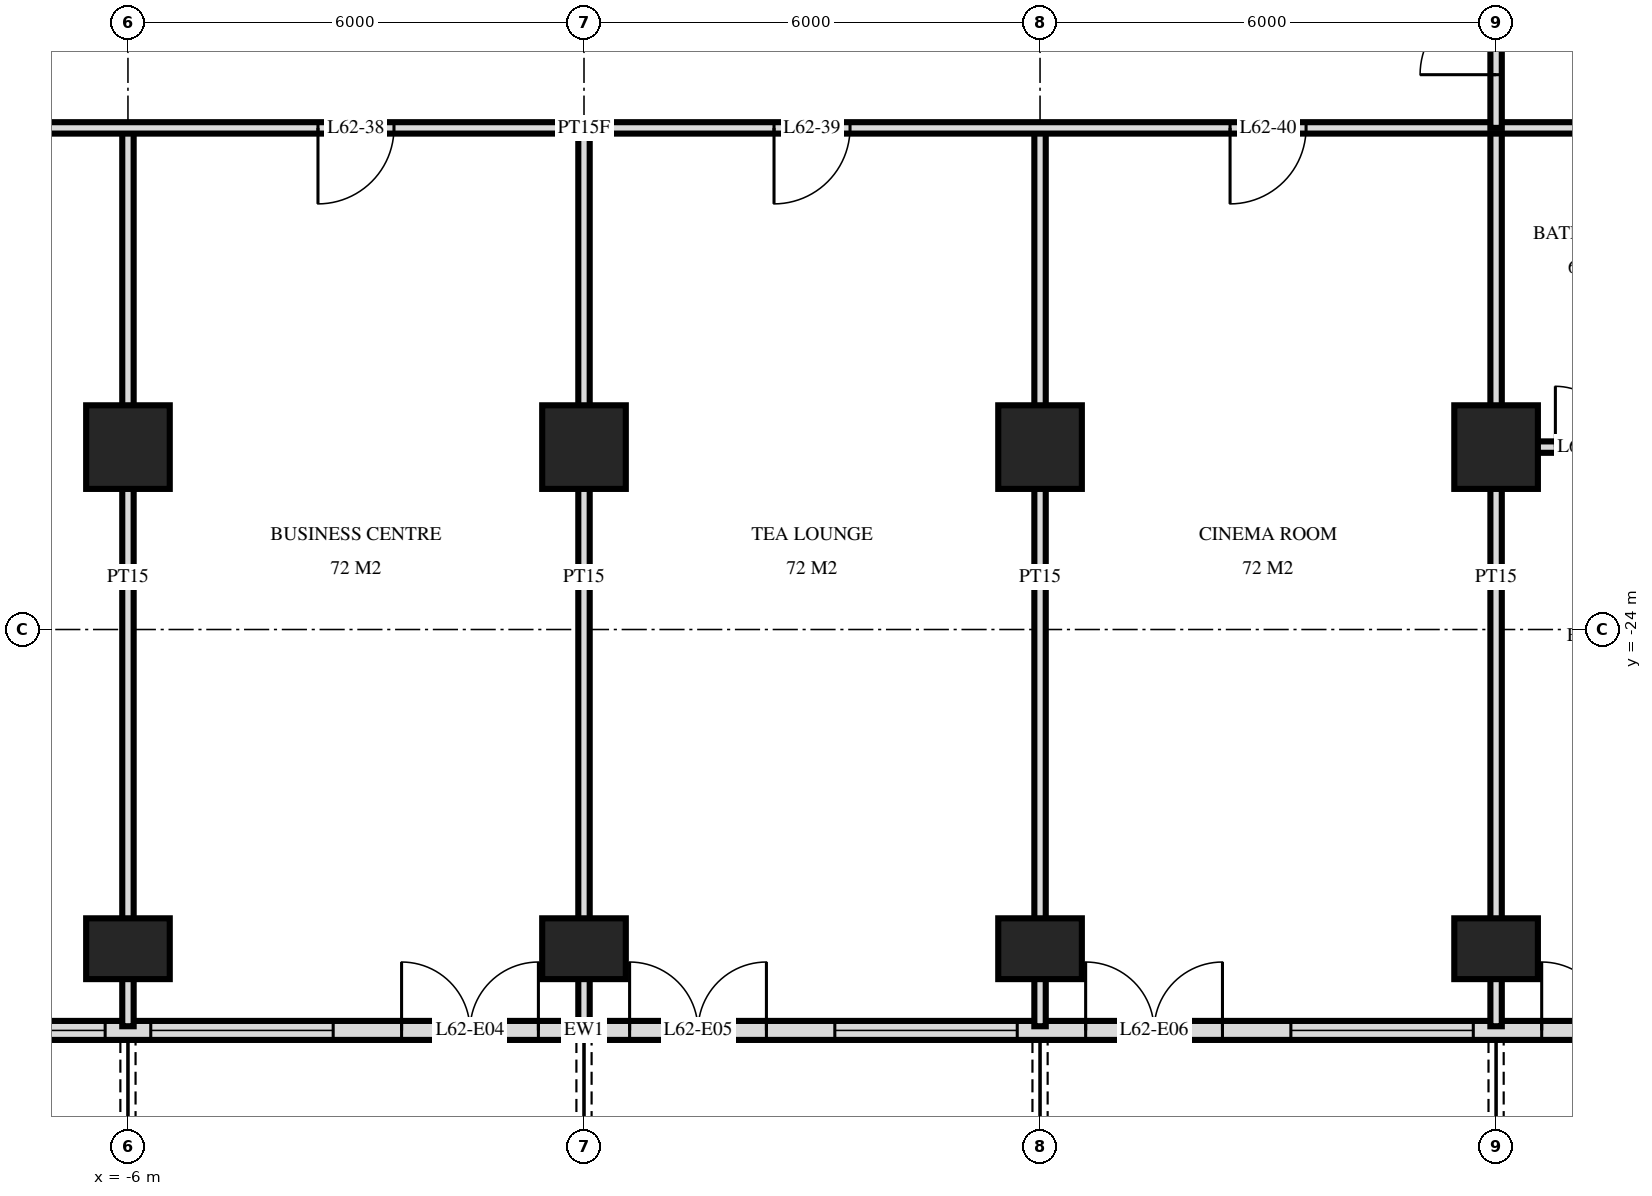
"""IFC4 building model, lengths in metres.
Left out: names, types, materials, properties, quantities, classifications, styles, units other than length and angle.
Written with IfcOpenShell. Run it as: python <this file> out.ifc"""

import sys

from ifc_helpers import new_model, si_unit, direction, frame, frame_2d, origin, origin_2d, place, context, subcontext, project, spatial, rectangle, extrude, element, fill, save


model = new_model("IFC4")
c1 = context("Model", 3, precision=1e-05, world=origin(), true_north=direction((0.0, 1.0)))
c2 = subcontext(c1, "Body", "Model", "MODEL_VIEW")
j1 = project(units=[si_unit("LENGTHUNIT", "METRE"), si_unit("PLANEANGLEUNIT", "RADIAN")], contexts=[c1])
p1 = place(None, origin())
s1 = spatial("IfcSite", under=j1, at=p1, CompositionType="ELEMENT")
p2 = place(p1, origin())
s2 = spatial("IfcBuilding", under=s1, at=p2, CompositionType="ELEMENT")
p3 = place(p2, frame((0.0, 0.0, 236.1)))
s3 = spatial("IfcBuildingStorey", under=s2, at=p3, CompositionType="ELEMENT", Elevation=236.1)
p4 = place(p3, frame((-6.0, -28.2, 0.0), z_axis=(0.0, 0.0, 1.0), x_axis=(1.0, 0.0, 0.0)))
e1 = element("IfcColumn", 1, at=p4, inside=s3, PredefinedType="COLUMN", context=c2, shape_type="SweptSolid", body=[
    extrude(rectangle(XDim=1.1, YDim=0.8, at=origin_2d()), origin(), (0.0, 0.0, 1.0), 3.5),
])
p5 = place(p3, frame((-6.0, -21.6, 0.0), z_axis=(0.0, 0.0, 1.0), x_axis=(1.0, 0.0, 0.0)))
e2 = element("IfcColumn", 2, at=p5, inside=s3, PredefinedType="COLUMN", context=c2, shape_type="SweptSolid", body=[
    extrude(rectangle(XDim=1.1, YDim=1.1, at=origin_2d()), origin(), (0.0, 0.0, 1.0), 3.5),
])
p6 = place(p3, frame((0.0, -28.2, 0.0), z_axis=(0.0, 0.0, 1.0), x_axis=(1.0, 0.0, 0.0)))
e3 = element("IfcColumn", 3, at=p6, inside=s3, PredefinedType="COLUMN", context=c2, shape_type="SweptSolid", body=[
    extrude(rectangle(XDim=1.1, YDim=0.8, at=origin_2d()), origin(), (0.0, 0.0, 1.0), 3.5),
])
p7 = place(p3, frame((0.0, -21.6, 0.0), z_axis=(0.0, 0.0, 1.0), x_axis=(1.0, 0.0, 0.0)))
e4 = element("IfcColumn", 4, at=p7, inside=s3, PredefinedType="COLUMN", context=c2, shape_type="SweptSolid", body=[
    extrude(rectangle(XDim=1.1, YDim=1.1, at=origin_2d()), origin(), (0.0, 0.0, 1.0), 3.5),
])
p8 = place(p3, frame((6.0, -28.2, 0.0), z_axis=(0.0, 0.0, 1.0), x_axis=(1.0, 0.0, 0.0)))
e5 = element("IfcColumn", 5, at=p8, inside=s3, PredefinedType="COLUMN", context=c2, shape_type="SweptSolid", body=[
    extrude(rectangle(XDim=1.1, YDim=0.8, at=origin_2d()), origin(), (0.0, 0.0, 1.0), 3.5),
])
p9 = place(p3, frame((6.0, -21.6, 0.0), z_axis=(0.0, 0.0, 1.0), x_axis=(1.0, 0.0, 0.0)))
e6 = element("IfcColumn", 6, at=p9, inside=s3, PredefinedType="COLUMN", context=c2, shape_type="SweptSolid", body=[
    extrude(rectangle(XDim=1.1, YDim=1.1, at=origin_2d()), origin(), (0.0, 0.0, 1.0), 3.5),
])
p10 = place(p3, frame((12.0, -28.2, 0.0), z_axis=(0.0, 0.0, 1.0), x_axis=(1.0, 0.0, 0.0)))
e7 = element("IfcColumn", 7, at=p10, inside=s3, PredefinedType="COLUMN", context=c2, shape_type="SweptSolid", body=[
    extrude(rectangle(XDim=1.1, YDim=0.8, at=origin_2d()), origin(), (0.0, 0.0, 1.0), 3.5),
])
p11 = place(p3, frame((12.0, -21.6, 0.0), z_axis=(0.0, 0.0, 1.0), x_axis=(1.0, 0.0, 0.0)))
e8 = element("IfcColumn", 8, at=p11, inside=s3, PredefinedType="COLUMN", context=c2, shape_type="SweptSolid", body=[
    extrude(rectangle(XDim=1.1, YDim=1.1, at=origin_2d()), origin(), (0.0, 0.0, 1.0), 3.5),
])
p12 = place(p3, frame((-22.475, -29.275, 0.0), z_axis=(0.0, 0.0, 1.0), x_axis=(1.0, 0.0, 0.0)))
e9 = element("IfcWall", 9, at=p12, inside=s3, PredefinedType="SOLIDWALL", context=c2, shape_type="SweptSolid", body=[
    extrude(rectangle(XDim=44.951, YDim=0.25, at=frame_2d((22.475, 0.0))), origin(), (0.0, 0.0, 1.0), 3.22),
])
p13 = place(p12, frame((0.575, 0.0, 0.0)))
e10 = element("IfcOpeningElement", 10, at=p13, cuts=e9, PredefinedType="OPENING", context=c2, shape_type="SweptSolid", body=[
    extrude(rectangle(XDim=1.8, YDim=2.4, at=frame_2d((0.9, 1.2))), frame((0.0, 0.135, 0.0), z_axis=(0.0, -1.0, 0.0), x_axis=(1.0, 0.0, 0.0)), (0.0, 0.0, 1.0), 0.27),
])
p14 = place(p12, frame((4.775, 0.0, 0.9)))
e11 = element("IfcOpeningElement", 11, at=p14, cuts=e9, PredefinedType="OPENING", context=c2, shape_type="SweptSolid", body=[
    extrude(rectangle(XDim=2.4, YDim=1.5, at=frame_2d((1.2, 0.75))), frame((0.0, 0.135, 0.0), z_axis=(0.0, -1.0, 0.0), x_axis=(1.0, 0.0, 0.0)), (0.0, 0.0, 1.0), 0.27),
])
p15 = place(p12, frame((8.075, 0.0, 0.0)))
e12 = element("IfcOpeningElement", 12, at=p15, cuts=e9, PredefinedType="OPENING", context=c2, shape_type="SweptSolid", body=[
    extrude(rectangle(XDim=1.8, YDim=2.4, at=frame_2d((0.9, 1.2))), frame((0.0, 0.135, 0.0), z_axis=(0.0, -1.0, 0.0), x_axis=(1.0, 0.0, 0.0)), (0.0, 0.0, 1.0), 0.27),
])
p16 = place(p12, frame((11.075, 0.0, 0.0)))
e13 = element("IfcOpeningElement", 13, at=p16, cuts=e9, PredefinedType="OPENING", context=c2, shape_type="SweptSolid", body=[
    extrude(rectangle(XDim=1.8, YDim=2.4, at=frame_2d((0.9, 1.2))), frame((0.0, 0.135, 0.0), z_axis=(0.0, -1.0, 0.0), x_axis=(1.0, 0.0, 0.0)), (0.0, 0.0, 1.0), 0.27),
])
p17 = place(p12, frame((13.775, 0.0, 0.9)))
e14 = element("IfcOpeningElement", 14, at=p17, cuts=e9, PredefinedType="OPENING", context=c2, shape_type="SweptSolid", body=[
    extrude(rectangle(XDim=2.4, YDim=1.5, at=frame_2d((1.2, 0.75))), frame((0.0, 0.135, 0.0), z_axis=(0.0, -1.0, 0.0), x_axis=(1.0, 0.0, 0.0)), (0.0, 0.0, 1.0), 0.27),
])
p18 = place(p12, frame((16.775, 0.0, 0.9)))
e15 = element("IfcOpeningElement", 15, at=p18, cuts=e9, PredefinedType="OPENING", context=c2, shape_type="SweptSolid", body=[
    extrude(rectangle(XDim=2.4, YDim=1.5, at=frame_2d((1.2, 0.75))), frame((0.0, 0.135, 0.0), z_axis=(0.0, -1.0, 0.0), x_axis=(1.0, 0.0, 0.0)), (0.0, 0.0, 1.0), 0.27),
])
p19 = place(p12, frame((20.075, 0.0, 0.0)))
e16 = element("IfcOpeningElement", 16, at=p19, cuts=e9, PredefinedType="OPENING", context=c2, shape_type="SweptSolid", body=[
    extrude(rectangle(XDim=1.8, YDim=2.4, at=frame_2d((0.9, 1.2))), frame((0.0, 0.135, 0.0), z_axis=(0.0, -1.0, 0.0), x_axis=(1.0, 0.0, 0.0)), (0.0, 0.0, 1.0), 0.27),
])
p20 = place(p12, frame((23.075, 0.0, 0.0)))
e17 = element("IfcOpeningElement", 17, at=p20, cuts=e9, PredefinedType="OPENING", context=c2, shape_type="SweptSolid", body=[
    extrude(rectangle(XDim=1.8, YDim=2.4, at=frame_2d((0.9, 1.2))), frame((0.0, 0.135, 0.0), z_axis=(0.0, -1.0, 0.0), x_axis=(1.0, 0.0, 0.0)), (0.0, 0.0, 1.0), 0.27),
])
p21 = place(p12, frame((25.775, 0.0, 0.9)))
e18 = element("IfcOpeningElement", 18, at=p21, cuts=e9, PredefinedType="OPENING", context=c2, shape_type="SweptSolid", body=[
    extrude(rectangle(XDim=2.4, YDim=1.5, at=frame_2d((1.2, 0.75))), frame((0.0, 0.135, 0.0), z_axis=(0.0, -1.0, 0.0), x_axis=(1.0, 0.0, 0.0)), (0.0, 0.0, 1.0), 0.27),
])
p22 = place(p12, frame((29.075, 0.0, 0.0)))
e19 = element("IfcOpeningElement", 19, at=p22, cuts=e9, PredefinedType="OPENING", context=c2, shape_type="SweptSolid", body=[
    extrude(rectangle(XDim=1.8, YDim=2.4, at=frame_2d((0.9, 1.2))), frame((0.0, 0.135, 0.0), z_axis=(0.0, -1.0, 0.0), x_axis=(1.0, 0.0, 0.0)), (0.0, 0.0, 1.0), 0.27),
])
p23 = place(p12, frame((31.775, 0.0, 0.9)))
e20 = element("IfcOpeningElement", 20, at=p23, cuts=e9, PredefinedType="OPENING", context=c2, shape_type="SweptSolid", body=[
    extrude(rectangle(XDim=2.4, YDim=1.5, at=frame_2d((1.2, 0.75))), frame((0.0, 0.135, 0.0), z_axis=(0.0, -1.0, 0.0), x_axis=(1.0, 0.0, 0.0)), (0.0, 0.0, 1.0), 0.27),
])
p24 = place(p12, frame((35.075, 0.0, 0.0)))
e21 = element("IfcOpeningElement", 21, at=p24, cuts=e9, PredefinedType="OPENING", context=c2, shape_type="SweptSolid", body=[
    extrude(rectangle(XDim=1.8, YDim=2.4, at=frame_2d((0.9, 1.2))), frame((0.0, 0.135, 0.0), z_axis=(0.0, -1.0, 0.0), x_axis=(1.0, 0.0, 0.0)), (0.0, 0.0, 1.0), 0.27),
])
p25 = place(p12, frame((41.075, 0.0, 0.0)))
e22 = element("IfcOpeningElement", 22, at=p25, cuts=e9, PredefinedType="OPENING", context=c2, shape_type="SweptSolid", body=[
    extrude(rectangle(XDim=1.8, YDim=2.4, at=frame_2d((0.9, 1.2))), frame((0.0, 0.135, 0.0), z_axis=(0.0, -1.0, 0.0), x_axis=(1.0, 0.0, 0.0)), (0.0, 0.0, 1.0), 0.27),
])
p26 = place(p3, frame((12.0, -17.4, 0.0), z_axis=(0.0, 0.0, 1.0), x_axis=(0.0, 1.0, 0.0)))
e23 = element("IfcWall", 23, at=p26, inside=s3, PredefinedType="PARTITIONING", context=c2, shape_type="SweptSolid", body=[
    extrude(rectangle(XDim=2.35, YDim=0.15, at=frame_2d((1.175, 0.0))), origin(), (0.0, 0.0, 1.0), 3.22),
])
p27 = place(p26, frame((0.7, 0.0, 0.0)))
e24 = element("IfcOpeningElement", 24, at=p27, cuts=e23, PredefinedType="OPENING", context=c2, shape_type="SweptSolid", body=[
    extrude(rectangle(XDim=1.0, YDim=2.1, at=frame_2d((0.5, 1.05))), frame((0.0, 0.085, 0.0), z_axis=(0.0, -1.0, 0.0), x_axis=(1.0, 0.0, 0.0)), (0.0, 0.0, 1.0), 0.17),
])
for number, where, z_axis, x_axis in (
    (25, (12.0, -29.22, 0.0), (0.0, 0.0, 1.0), (0.0, 1.0, 0.0)),
    (26, (6.0, -29.22, 0.0), (0.0, 0.0, 1.0), (0.0, 1.0, 0.0)),
    (27, (0.0, -29.22, 0.0), (0.0, 0.0, 1.0), (0.0, 1.0, 0.0)),
    (28, (-6.0, -29.22, 0.0), (0.0, 0.0, 1.0), (0.0, 1.0, 0.0)),
):
    element("IfcWall", number, at=place(p3, frame(where, z_axis=z_axis, x_axis=x_axis)), inside=s3, PredefinedType="PARTITIONING", context=c2, shape_type="SweptSolid", body=[
        extrude(rectangle(XDim=11.82, YDim=0.15, at=frame_2d((5.91, 0.0))), origin(), (0.0, 0.0, 1.0), 3.22),
    ])
p28 = place(p3, frame((12.0, -21.6, 0.0), z_axis=(0.0, 0.0, 1.0), x_axis=(1.0, 0.0, 0.0)))
e29 = element("IfcWall", 29, at=p28, inside=s3, PredefinedType="PARTITIONING", context=c2, shape_type="SweptSolid", body=[
    extrude(rectangle(XDim=8.4, YDim=0.15, at=frame_2d((4.2, 0.0))), origin(), (0.0, 0.0, 1.0), 3.22),
])
p29 = place(p28, frame((0.78, 0.0, 0.0)))
e30 = element("IfcOpeningElement", 30, at=p29, cuts=e29, PredefinedType="OPENING", context=c2, shape_type="SweptSolid", body=[
    extrude(rectangle(XDim=0.8, YDim=2.1, at=frame_2d((0.4, 1.05))), frame((0.0, 0.085, 0.0), z_axis=(0.0, -1.0, 0.0), x_axis=(1.0, 0.0, 0.0)), (0.0, 0.0, 1.0), 0.17),
])
p30 = place(p28, frame((2.98, 0.0, 0.0)))
e31 = element("IfcOpeningElement", 31, at=p30, cuts=e29, PredefinedType="OPENING", context=c2, shape_type="SweptSolid", body=[
    extrude(rectangle(XDim=0.9, YDim=2.1, at=frame_2d((0.45, 1.05))), frame((0.0, 0.085, 0.0), z_axis=(0.0, -1.0, 0.0), x_axis=(1.0, 0.0, 0.0)), (0.0, 0.0, 1.0), 0.17),
])
p31 = place(p3, frame((-26.82, -17.4, 0.0), z_axis=(0.0, 0.0, 1.0), x_axis=(1.0, 0.0, 0.0)))
e32 = element("IfcWall", 32, at=p31, inside=s3, PredefinedType="PARTITIONING", context=c2, shape_type="SweptSolid", body=[
    extrude(rectangle(XDim=53.64, YDim=0.15, at=frame_2d((26.82, 0.0))), origin(), (0.0, 0.0, 1.0), 3.22),
])
p32 = place(p31, frame((11.97, 0.0, 0.0)))
e33 = element("IfcOpeningElement", 33, at=p32, cuts=e32, PredefinedType="OPENING", context=c2, shape_type="SweptSolid", body=[
    extrude(rectangle(XDim=1.0, YDim=2.1, at=frame_2d((0.5, 1.05))), frame((0.0, 0.085, 0.0), z_axis=(0.0, -1.0, 0.0), x_axis=(1.0, 0.0, 0.0)), (0.0, 0.0, 1.0), 0.17),
])
p33 = place(p31, frame((3.92, 0.0, 0.0)))
e34 = element("IfcOpeningElement", 34, at=p33, cuts=e32, PredefinedType="OPENING", context=c2, shape_type="SweptSolid", body=[
    extrude(rectangle(XDim=1.0, YDim=2.1, at=frame_2d((0.5, 1.05))), frame((0.0, 0.085, 0.0), z_axis=(0.0, -1.0, 0.0), x_axis=(1.0, 0.0, 0.0)), (0.0, 0.0, 1.0), 0.17),
])
p34 = place(p31, frame((5.72, 0.0, 0.0)))
e35 = element("IfcOpeningElement", 35, at=p34, cuts=e32, PredefinedType="OPENING", context=c2, shape_type="SweptSolid", body=[
    extrude(rectangle(XDim=1.0, YDim=2.1, at=frame_2d((0.5, 1.05))), frame((0.0, 0.085, 0.0), z_axis=(0.0, -1.0, 0.0), x_axis=(1.0, 0.0, 0.0)), (0.0, 0.0, 1.0), 0.17),
])
p35 = place(p31, frame((47.72, 0.0, 0.0)))
e36 = element("IfcOpeningElement", 36, at=p35, cuts=e32, PredefinedType="OPENING", context=c2, shape_type="SweptSolid", body=[
    extrude(rectangle(XDim=1.0, YDim=2.1, at=frame_2d((0.5, 1.05))), frame((0.0, 0.085, 0.0), z_axis=(0.0, -1.0, 0.0), x_axis=(1.0, 0.0, 0.0)), (0.0, 0.0, 1.0), 0.17),
])
p36 = place(p31, frame((51.02, 0.0, 0.0)))
e37 = element("IfcOpeningElement", 37, at=p36, cuts=e32, PredefinedType="OPENING", context=c2, shape_type="SweptSolid", body=[
    extrude(rectangle(XDim=1.0, YDim=2.1, at=frame_2d((0.5, 1.05))), frame((0.0, 0.085, 0.0), z_axis=(0.0, -1.0, 0.0), x_axis=(1.0, 0.0, 0.0)), (0.0, 0.0, 1.0), 0.17),
])
p37 = place(p31, frame((17.32, 0.0, 0.0)))
e38 = element("IfcOpeningElement", 38, at=p37, cuts=e32, PredefinedType="OPENING", context=c2, shape_type="SweptSolid", body=[
    extrude(rectangle(XDim=1.0, YDim=2.1, at=frame_2d((0.5, 1.05))), frame((0.0, 0.085, 0.0), z_axis=(0.0, -1.0, 0.0), x_axis=(1.0, 0.0, 0.0)), (0.0, 0.0, 1.0), 0.17),
])
p38 = place(p31, frame((23.32, 0.0, 0.0)))
e39 = element("IfcOpeningElement", 39, at=p38, cuts=e32, PredefinedType="OPENING", context=c2, shape_type="SweptSolid", body=[
    extrude(rectangle(XDim=1.0, YDim=2.1, at=frame_2d((0.5, 1.05))), frame((0.0, 0.085, 0.0), z_axis=(0.0, -1.0, 0.0), x_axis=(1.0, 0.0, 0.0)), (0.0, 0.0, 1.0), 0.17),
])
p39 = place(p31, frame((29.32, 0.0, 0.0)))
e40 = element("IfcOpeningElement", 40, at=p39, cuts=e32, PredefinedType="OPENING", context=c2, shape_type="SweptSolid", body=[
    extrude(rectangle(XDim=1.0, YDim=2.1, at=frame_2d((0.5, 1.05))), frame((0.0, 0.085, 0.0), z_axis=(0.0, -1.0, 0.0), x_axis=(1.0, 0.0, 0.0)), (0.0, 0.0, 1.0), 0.17),
])
p40 = place(p31, frame((35.32, 0.0, 0.0)))
e41 = element("IfcOpeningElement", 41, at=p40, cuts=e32, PredefinedType="OPENING", context=c2, shape_type="SweptSolid", body=[
    extrude(rectangle(XDim=1.0, YDim=2.1, at=frame_2d((0.5, 1.05))), frame((0.0, 0.085, 0.0), z_axis=(0.0, -1.0, 0.0), x_axis=(1.0, 0.0, 0.0)), (0.0, 0.0, 1.0), 0.17),
])
p41 = place(p17, origin())
e42 = element("IfcWindow", 42, at=p41, inside=s3, PartitioningType="SINGLE_PANEL", PredefinedType="WINDOW", context=c2, shape_type="SweptSolid", body=[
    extrude(rectangle(XDim=2.4, YDim=1.5, at=frame_2d((1.2, 0.75))), frame((0.0, 0.03, 0.0), z_axis=(0.0, -1.0, 0.0), x_axis=(1.0, 0.0, 0.0)), (0.0, 0.0, 1.0), 0.06),
])
fill(e14, e42)
p42 = place(p18, origin())
e43 = element("IfcWindow", 43, at=p42, inside=s3, PartitioningType="SINGLE_PANEL", PredefinedType="WINDOW", context=c2, shape_type="SweptSolid", body=[
    extrude(rectangle(XDim=2.4, YDim=1.5, at=frame_2d((1.2, 0.75))), frame((0.0, 0.03, 0.0), z_axis=(0.0, -1.0, 0.0), x_axis=(1.0, 0.0, 0.0)), (0.0, 0.0, 1.0), 0.06),
])
fill(e15, e43)
p43 = place(p19, origin())
e44 = element("IfcDoor", 44, at=p43, inside=s3, OperationType="DOUBLE_DOOR_SINGLE_SWING", PredefinedType="DOOR", context=c2, shape_type="SweptSolid", body=[
    extrude(rectangle(XDim=1.8, YDim=2.4, at=frame_2d((0.9, 1.2))), frame((0.0, 0.025, 0.0), z_axis=(0.0, -1.0, 0.0), x_axis=(1.0, 0.0, 0.0)), (0.0, 0.0, 1.0), 0.05),
])
fill(e16, e44)
p44 = place(p20, origin())
e45 = element("IfcDoor", 45, at=p44, inside=s3, OperationType="DOUBLE_DOOR_SINGLE_SWING", PredefinedType="DOOR", context=c2, shape_type="SweptSolid", body=[
    extrude(rectangle(XDim=1.8, YDim=2.4, at=frame_2d((0.9, 1.2))), frame((0.0, 0.025, 0.0), z_axis=(0.0, -1.0, 0.0), x_axis=(1.0, 0.0, 0.0)), (0.0, 0.0, 1.0), 0.05),
])
fill(e17, e45)
p45 = place(p21, origin())
e46 = element("IfcWindow", 46, at=p45, inside=s3, PartitioningType="SINGLE_PANEL", PredefinedType="WINDOW", context=c2, shape_type="SweptSolid", body=[
    extrude(rectangle(XDim=2.4, YDim=1.5, at=frame_2d((1.2, 0.75))), frame((0.0, 0.03, 0.0), z_axis=(0.0, -1.0, 0.0), x_axis=(1.0, 0.0, 0.0)), (0.0, 0.0, 1.0), 0.06),
])
fill(e18, e46)
p46 = place(p22, origin())
e47 = element("IfcDoor", 47, at=p46, inside=s3, OperationType="DOUBLE_DOOR_SINGLE_SWING", PredefinedType="DOOR", context=c2, shape_type="SweptSolid", body=[
    extrude(rectangle(XDim=1.8, YDim=2.4, at=frame_2d((0.9, 1.2))), frame((0.0, 0.025, 0.0), z_axis=(0.0, -1.0, 0.0), x_axis=(1.0, 0.0, 0.0)), (0.0, 0.0, 1.0), 0.05),
])
fill(e19, e47)
p47 = place(p23, origin())
e48 = element("IfcWindow", 48, at=p47, inside=s3, PartitioningType="SINGLE_PANEL", PredefinedType="WINDOW", context=c2, shape_type="SweptSolid", body=[
    extrude(rectangle(XDim=2.4, YDim=1.5, at=frame_2d((1.2, 0.75))), frame((0.0, 0.03, 0.0), z_axis=(0.0, -1.0, 0.0), x_axis=(1.0, 0.0, 0.0)), (0.0, 0.0, 1.0), 0.06),
])
fill(e20, e48)
p48 = place(p24, origin())
e49 = element("IfcDoor", 49, at=p48, inside=s3, OperationType="DOUBLE_DOOR_SINGLE_SWING", PredefinedType="DOOR", context=c2, shape_type="SweptSolid", body=[
    extrude(rectangle(XDim=1.8, YDim=2.4, at=frame_2d((0.9, 1.2))), frame((0.0, 0.025, 0.0), z_axis=(0.0, -1.0, 0.0), x_axis=(1.0, 0.0, 0.0)), (0.0, 0.0, 1.0), 0.05),
])
fill(e21, e49)
p49 = place(p27, origin())
e50 = element("IfcDoor", 50, at=p49, inside=s3, OperationType="SINGLE_SWING_RIGHT", PredefinedType="DOOR", context=c2, shape_type="SweptSolid", body=[
    extrude(rectangle(XDim=1.0, YDim=2.1, at=frame_2d((0.5, 1.05))), frame((0.0, 0.025, 0.0), z_axis=(0.0, -1.0, 0.0), x_axis=(1.0, 0.0, 0.0)), (0.0, 0.0, 1.0), 0.05),
])
fill(e24, e50)
p50 = place(p38, frame((0.5, 0.0, 0.0), z_axis=(0.0, 0.0, 1.0), x_axis=(-1.0, 0.0, 0.0)))
e51 = element("IfcDoor", 51, at=p50, inside=s3, OperationType="SINGLE_SWING_LEFT", PredefinedType="DOOR", context=c2, shape_type="SweptSolid", body=[
    extrude(rectangle(XDim=1.0, YDim=2.1, at=frame_2d((0.0, 1.05))), frame((0.0, -0.025, 0.0), z_axis=(0.0, 1.0, 0.0), x_axis=(-1.0, 0.0, 0.0)), (0.0, 0.0, 1.0), 0.05),
])
fill(e39, e51)
p51 = place(p39, frame((0.5, 0.0, 0.0), z_axis=(0.0, 0.0, 1.0), x_axis=(-1.0, 0.0, 0.0)))
e52 = element("IfcDoor", 52, at=p51, inside=s3, OperationType="SINGLE_SWING_LEFT", PredefinedType="DOOR", context=c2, shape_type="SweptSolid", body=[
    extrude(rectangle(XDim=1.0, YDim=2.1, at=frame_2d((0.0, 1.05))), frame((0.0, -0.025, 0.0), z_axis=(0.0, 1.0, 0.0), x_axis=(-1.0, 0.0, 0.0)), (0.0, 0.0, 1.0), 0.05),
])
fill(e40, e52)
p52 = place(p40, frame((0.5, 0.0, 0.0), z_axis=(0.0, 0.0, 1.0), x_axis=(-1.0, 0.0, 0.0)))
e53 = element("IfcDoor", 53, at=p52, inside=s3, OperationType="SINGLE_SWING_LEFT", PredefinedType="DOOR", context=c2, shape_type="SweptSolid", body=[
    extrude(rectangle(XDim=1.0, YDim=2.1, at=frame_2d((0.0, 1.05))), frame((0.0, -0.025, 0.0), z_axis=(0.0, 1.0, 0.0), x_axis=(-1.0, 0.0, 0.0)), (0.0, 0.0, 1.0), 0.05),
])
fill(e41, e53)
p53 = place(p29, origin())
e54 = element("IfcDoor", 54, at=p53, inside=s3, OperationType="SINGLE_SWING_RIGHT", PredefinedType="DOOR", context=c2, shape_type="SweptSolid", body=[
    extrude(rectangle(XDim=0.8, YDim=2.1, at=frame_2d((0.4, 1.05))), frame((0.0, 0.025, 0.0), z_axis=(0.0, -1.0, 0.0), x_axis=(1.0, 0.0, 0.0)), (0.0, 0.0, 1.0), 0.05),
])
fill(e30, e54)
save(model, sys.argv[1])
